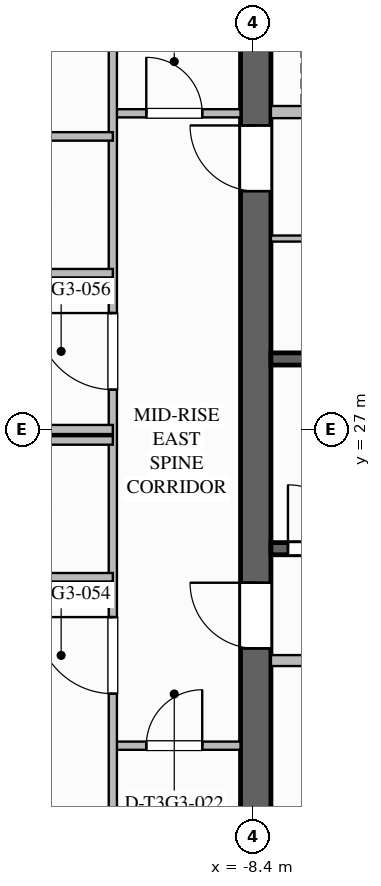
"""IFC4 building model, lengths in metres.
Left out: names, types, materials, properties, quantities, classifications, styles, units other than length and angle.
Written with IfcOpenShell. Run it as: python <this file> out.ifc"""

import sys

from ifc_helpers import new_model, si_unit, direction, frame, frame_2d, origin, place, context, subcontext, project, spatial, rectangle, extrude, element, fill, save


model = new_model("IFC4")
c1 = context("Model", 3, precision=1e-05, world=origin(), true_north=direction((0.0, 1.0)))
c2 = subcontext(c1, "Body", "Model", "MODEL_VIEW")
j1 = project(units=[si_unit("LENGTHUNIT", "METRE"), si_unit("PLANEANGLEUNIT", "RADIAN")], contexts=[c1])
p1 = place(None, origin())
s1 = spatial("IfcSite", under=j1, at=p1, CompositionType="ELEMENT")
p2 = place(p1, origin())
s2 = spatial("IfcBuilding", under=s1, at=p2, CompositionType="ELEMENT")
p3 = place(p2, frame((0.0, 0.0, 171.7)))
s3 = spatial("IfcBuildingStorey", under=s2, at=p3, CompositionType="ELEMENT", Elevation=171.7)
p4 = place(p3, frame((-8.35, 18.9, 0.0), z_axis=(0.0, 0.0, 1.0), x_axis=(0.0, 1.0, 0.0)))
e1 = element("IfcWall", 1, at=p4, inside=s3, PredefinedType="SHEAR", context=c2, shape_type="SweptSolid", body=[
    extrude(rectangle(XDim=16.2, YDim=0.5, at=frame_2d((8.1, 0.0))), origin(), (0.0, 0.0, 1.0), 3.55),
])
p5 = place(p4, frame((12.02, 0.0, 0.0)))
e2 = element("IfcOpeningElement", 2, at=p5, cuts=e1, PredefinedType="OPENING", context=c2, shape_type="SweptSolid", body=[
    extrude(rectangle(XDim=1.08, YDim=2.04, at=frame_2d((0.54, 1.02))), frame((0.0, 0.26, 0.0), z_axis=(0.0, -1.0, 0.0), x_axis=(1.0, 0.0, 0.0)), (0.0, 0.0, 1.0), 0.52),
])
p6 = place(p4, frame((4.5, 0.0, 0.0)))
e3 = element("IfcOpeningElement", 3, at=p6, cuts=e1, PredefinedType="OPENING", context=c2, shape_type="SweptSolid", body=[
    extrude(rectangle(XDim=1.08, YDim=2.04, at=frame_2d((0.54, 1.02))), frame((0.0, 0.26, 0.0), z_axis=(0.0, -1.0, 0.0), x_axis=(1.0, 0.0, 0.0)), (0.0, 0.0, 1.0), 0.52),
])
p7 = place(p3, frame((-8.1, 25.04, 0.0), z_axis=(0.0, 0.0, 1.0), x_axis=(1.0, 0.0, 0.0)))
e4 = element("IfcWall", 4, at=p7, inside=s3, PredefinedType="SOLIDWALL", context=c2, shape_type="SweptSolid", body=[
    extrude(rectangle(XDim=8.1, YDim=0.2, at=frame_2d((4.05, 0.0))), origin(), (0.0, 0.0, 1.0), 3.29),
])
p8 = place(p7, frame((0.28, 0.0, 0.0)))
e5 = element("IfcOpeningElement", 5, at=p8, cuts=e4, PredefinedType="OPENING", context=c2, shape_type="SweptSolid", body=[
    extrude(rectangle(XDim=1.05, YDim=2.1, at=frame_2d((0.525, 1.05))), frame((0.0, 0.11, 0.0), z_axis=(0.0, -1.0, 0.0), x_axis=(1.0, 0.0, 0.0)), (0.0, 0.0, 1.0), 0.22),
])
p9 = place(p3, frame((-8.1, 28.16, 0.0), z_axis=(0.0, 0.0, 1.0), x_axis=(1.0, 0.0, 0.0)))
e6 = element("IfcWall", 6, at=p9, inside=s3, PredefinedType="SOLIDWALL", context=c2, shape_type="SweptSolid", body=[
    extrude(rectangle(XDim=8.1, YDim=0.2, at=frame_2d((4.05, 0.0))), origin(), (0.0, 0.0, 1.0), 3.29),
])
p10 = place(p3, frame((-8.1, 32.22, 0.0), z_axis=(0.0, 0.0, 1.0), x_axis=(1.0, 0.0, 0.0)))
e7 = element("IfcWall", 7, at=p10, inside=s3, PredefinedType="SOLIDWALL", context=c2, shape_type="SweptSolid", body=[
    extrude(rectangle(XDim=7.1, YDim=0.2, at=frame_2d((3.55, 0.0))), origin(), (0.0, 0.0, 1.0), 3.29),
])
p11 = place(p10, frame((0.95, 0.0, 0.0)))
e8 = element("IfcOpeningElement", 8, at=p11, cuts=e7, PredefinedType="OPENING", context=c2, shape_type="SweptSolid", body=[
    extrude(rectangle(XDim=1.1, YDim=2.2, at=frame_2d((0.55, 1.1))), frame((0.0, 0.11, 0.0), z_axis=(0.0, -1.0, 0.0), x_axis=(1.0, 0.0, 0.0)), (0.0, 0.0, 1.0), 0.22),
])
p12 = place(p10, frame((3.27, 0.0, 0.0)))
e9 = element("IfcOpeningElement", 9, at=p12, cuts=e7, PredefinedType="OPENING", context=c2, shape_type="SweptSolid", body=[
    extrude(rectangle(XDim=1.1, YDim=2.2, at=frame_2d((0.55, 1.1))), frame((0.0, 0.11, 0.0), z_axis=(0.0, -1.0, 0.0), x_axis=(1.0, 0.0, 0.0)), (0.0, 0.0, 1.0), 0.22),
])
p13 = place(p10, frame((5.59, 0.0, 0.0)))
e10 = element("IfcOpeningElement", 10, at=p13, cuts=e7, PredefinedType="OPENING", context=c2, shape_type="SweptSolid", body=[
    extrude(rectangle(XDim=1.1, YDim=2.2, at=frame_2d((0.55, 1.1))), frame((0.0, 0.11, 0.0), z_axis=(0.0, -1.0, 0.0), x_axis=(1.0, 0.0, 0.0)), (0.0, 0.0, 1.0), 0.22),
])
p14 = place(p3, frame((-8.1, 30.14, 0.0), z_axis=(0.0, 0.0, 1.0), x_axis=(1.0, 0.0, 0.0)))
e11 = element("IfcWall", 11, at=p14, inside=s3, PredefinedType="PARTITIONING", context=c2, shape_type="SweptSolid", body=[
    extrude(rectangle(XDim=7.1, YDim=0.1, at=frame_2d((3.55, 0.0))), origin(), (0.0, 0.0, 1.0), 3.29),
])
p15 = place(p14, frame((2.8, 0.0, 0.0)))
e12 = element("IfcOpeningElement", 12, at=p15, cuts=e11, PredefinedType="OPENING", context=c2, shape_type="SweptSolid", body=[
    extrude(rectangle(XDim=0.92, YDim=2.1, at=frame_2d((0.46, 1.05))), frame((0.0, 0.06, 0.0), z_axis=(0.0, -1.0, 0.0), x_axis=(1.0, 0.0, 0.0)), (0.0, 0.0, 1.0), 0.12),
])
p16 = place(p3, frame((-8.1, 23.2, 0.0), z_axis=(0.0, 0.0, 1.0), x_axis=(1.0, 0.0, 0.0)))
e13 = element("IfcWall", 13, at=p16, inside=s3, PredefinedType="SOLIDWALL", context=c2, shape_type="SweptSolid", body=[
    extrude(rectangle(XDim=8.65, YDim=0.18, at=frame_2d((4.325, 0.0))), origin(), (0.0, 0.0, 1.0), 3.29),
])
p17 = place(p16, frame((1.6, 0.0, 0.0)))
e14 = element("IfcOpeningElement", 14, at=p17, cuts=e13, PredefinedType="OPENING", context=c2, shape_type="SweptSolid", body=[
    extrude(rectangle(XDim=1.0, YDim=2.1, at=frame_2d((0.5, 1.05))), frame((0.0, 0.1, 0.0), z_axis=(0.0, -1.0, 0.0), x_axis=(1.0, 0.0, 0.0)), (0.0, 0.0, 1.0), 0.2),
])
p18 = place(p16, frame((6.2, 0.0, 0.0)))
e15 = element("IfcOpeningElement", 15, at=p18, cuts=e13, PredefinedType="OPENING", context=c2, shape_type="SweptSolid", body=[
    extrude(rectangle(XDim=1.0, YDim=2.1, at=frame_2d((0.5, 1.05))), frame((0.0, 0.1, 0.0), z_axis=(0.0, -1.0, 0.0), x_axis=(1.0, 0.0, 0.0)), (0.0, 0.0, 1.0), 0.2),
])
p19 = place(p3, frame((-10.7, 21.8, 0.0), z_axis=(0.0, 0.0, 1.0), x_axis=(1.0, 0.0, 0.0)))
e16 = element("IfcWall", 16, at=p19, inside=s3, PredefinedType="PARTITIONING", context=c2, shape_type="SweptSolid", body=[
    extrude(rectangle(XDim=2.1, YDim=0.135, at=frame_2d((1.05, 0.0))), origin(), (0.0, 0.0, 1.0), 3.29),
])
p20 = place(p19, frame((0.55, 0.0, 0.0)))
e17 = element("IfcOpeningElement", 17, at=p20, cuts=e16, PredefinedType="OPENING", context=c2, shape_type="SweptSolid", body=[
    extrude(rectangle(XDim=0.92, YDim=2.1, at=frame_2d((0.46, 1.05))), frame((0.0, 0.077, 0.0), z_axis=(0.0, -1.0, 0.0), x_axis=(1.0, 0.0, 0.0)), (0.0, 0.0, 1.0), 0.155),
])
p21 = place(p3, frame((-10.7, 32.2, 0.0), z_axis=(0.0, 0.0, 1.0), x_axis=(1.0, 0.0, 0.0)))
e18 = element("IfcWall", 18, at=p21, inside=s3, PredefinedType="PARTITIONING", context=c2, shape_type="SweptSolid", body=[
    extrude(rectangle(XDim=2.1, YDim=0.135, at=frame_2d((1.05, 0.0))), origin(), (0.0, 0.0, 1.0), 3.29),
])
p22 = place(p21, frame((0.55, 0.0, 0.0)))
e19 = element("IfcOpeningElement", 19, at=p22, cuts=e18, PredefinedType="OPENING", context=c2, shape_type="SweptSolid", body=[
    extrude(rectangle(XDim=0.92, YDim=2.1, at=frame_2d((0.46, 1.05))), frame((0.0, 0.077, 0.0), z_axis=(0.0, -1.0, 0.0), x_axis=(1.0, 0.0, 0.0)), (0.0, 0.0, 1.0), 0.155),
])
p23 = place(p3, frame((-10.7, 18.4, 0.0), z_axis=(0.0, 0.0, 1.0), x_axis=(0.0, 1.0, 0.0)))
e20 = element("IfcWall", 20, at=p23, inside=s3, PredefinedType="PARTITIONING", context=c2, shape_type="SweptSolid", body=[
    extrude(rectangle(XDim=17.2, YDim=0.135, at=frame_2d((8.6, 0.0))), origin(), (0.0, 0.0, 1.0), 3.29),
])
p24 = place(p23, frame((4.255, 0.0, 0.0)))
e21 = element("IfcOpeningElement", 21, at=p24, cuts=e20, PredefinedType="OPENING", context=c2, shape_type="SweptSolid", body=[
    extrude(rectangle(XDim=1.26, YDim=2.2, at=frame_2d((0.63, 1.1))), frame((0.0, 0.077, 0.0), z_axis=(0.0, -1.0, 0.0), x_axis=(1.0, 0.0, 0.0)), (0.0, 0.0, 1.0), 0.155),
])
p25 = place(p23, frame((9.255, 0.0, 0.0)))
e22 = element("IfcOpeningElement", 22, at=p25, cuts=e20, PredefinedType="OPENING", context=c2, shape_type="SweptSolid", body=[
    extrude(rectangle(XDim=1.26, YDim=2.2, at=frame_2d((0.63, 1.1))), frame((0.0, 0.077, 0.0), z_axis=(0.0, -1.0, 0.0), x_axis=(1.0, 0.0, 0.0)), (0.0, 0.0, 1.0), 0.155),
])
p26 = place(p3, frame((-26.2, 27.0, 0.0), z_axis=(0.0, 0.0, 1.0), x_axis=(1.0, 0.0, 0.0)))
e23 = element("IfcWall", 23, at=p26, inside=s3, PredefinedType="PARTITIONING", context=c2, shape_type="SweptSolid", body=[
    extrude(rectangle(XDim=15.5, YDim=0.15, at=frame_2d((7.75, 0.0))), origin(), (0.0, 0.0, 1.0), 2.58),
])
p27 = place(p3, frame((-10.7, 24.57, 0.0), z_axis=(0.0, 0.0, 1.0), x_axis=(-1.0, 0.0, 0.0)))
e24 = element("IfcWall", 24, at=p27, inside=s3, PredefinedType="PLUMBINGWALL", context=c2, shape_type="SweptSolid", body=[
    extrude(rectangle(XDim=2.15, YDim=0.14, at=frame_2d((1.075, 0.0))), origin(), (0.0, 0.0, 1.0), 3.29),
])
p28 = place(p3, frame((-10.7, 26.82, 0.0), z_axis=(0.0, 0.0, 1.0), x_axis=(-1.0, 0.0, 0.0)))
e25 = element("IfcWall", 25, at=p28, inside=s3, PredefinedType="PLUMBINGWALL", context=c2, shape_type="SweptSolid", body=[
    extrude(rectangle(XDim=2.15, YDim=0.14, at=frame_2d((1.075, 0.0))), origin(), (0.0, 0.0, 1.0), 2.667),
])
for number, where, z_axis, x_axis in (
    (26, (-10.7, 29.57, 0.0), (0.0, 0.0, 1.0), (-1.0, 0.0, 0.0)),
    (27, (-10.7, 31.82, 0.0), (0.0, 0.0, 1.0), (-1.0, 0.0, 0.0)),
):
    element("IfcWall", number, at=place(p3, frame(where, z_axis=z_axis, x_axis=x_axis)), inside=s3, PredefinedType="PLUMBINGWALL", context=c2, shape_type="SweptSolid", body=[
        extrude(rectangle(XDim=2.15, YDim=0.14, at=frame_2d((1.075, 0.0))), origin(), (0.0, 0.0, 1.0), 3.29),
    ])
p29 = place(p8, origin())
e28 = element("IfcDoor", 28, at=p29, inside=s3, OperationType="SINGLE_SWING_LEFT", PredefinedType="DOOR", context=c2, shape_type="SweptSolid", body=[
    extrude(rectangle(XDim=1.05, YDim=2.1, at=frame_2d((0.525, 1.05))), frame((0.0, 0.025, 0.0), z_axis=(0.0, -1.0, 0.0), x_axis=(1.0, 0.0, 0.0)), (0.0, 0.0, 1.0), 0.05),
])
fill(e5, e28)
p30 = place(p5, origin())
e29 = element("IfcDoor", 29, at=p30, inside=s3, OperationType="SINGLE_SWING_RIGHT", PredefinedType="DOOR", context=c2, shape_type="SweptSolid", body=[
    extrude(rectangle(XDim=1.08, YDim=2.04, at=frame_2d((0.54, 1.02))), frame((0.0, 0.025, 0.0), z_axis=(0.0, -1.0, 0.0), x_axis=(1.0, 0.0, 0.0)), (0.0, 0.0, 1.0), 0.05),
])
fill(e2, e29)
p31 = place(p6, origin())
e30 = element("IfcDoor", 30, at=p31, inside=s3, OperationType="SINGLE_SWING_RIGHT", PredefinedType="DOOR", context=c2, shape_type="SweptSolid", body=[
    extrude(rectangle(XDim=1.08, YDim=2.04, at=frame_2d((0.54, 1.02))), frame((0.0, 0.025, 0.0), z_axis=(0.0, -1.0, 0.0), x_axis=(1.0, 0.0, 0.0)), (0.0, 0.0, 1.0), 0.05),
])
fill(e3, e30)
p32 = place(p20, origin())
e31 = element("IfcDoor", 31, at=p32, inside=s3, OperationType="SINGLE_SWING_RIGHT", PredefinedType="DOOR", context=c2, shape_type="SweptSolid", body=[
    extrude(rectangle(XDim=0.92, YDim=2.1, at=frame_2d((0.46, 1.05))), frame((0.0, 0.025, 0.0), z_axis=(0.0, -1.0, 0.0), x_axis=(1.0, 0.0, 0.0)), (0.0, 0.0, 1.0), 0.05),
])
fill(e17, e31)
p33 = place(p22, origin())
e32 = element("IfcDoor", 32, at=p33, inside=s3, OperationType="SINGLE_SWING_LEFT", PredefinedType="DOOR", context=c2, shape_type="SweptSolid", body=[
    extrude(rectangle(XDim=0.92, YDim=2.1, at=frame_2d((0.46, 1.05))), frame((0.0, 0.025, 0.0), z_axis=(0.0, -1.0, 0.0), x_axis=(1.0, 0.0, 0.0)), (0.0, 0.0, 1.0), 0.05),
])
fill(e19, e32)
p34 = place(p24, origin())
e33 = element("IfcDoor", 33, at=p34, inside=s3, OperationType="SINGLE_SWING_RIGHT", PredefinedType="DOOR", context=c2, shape_type="SweptSolid", body=[
    extrude(rectangle(XDim=1.26, YDim=2.2, at=frame_2d((0.63, 1.1))), frame((0.0, 0.025, 0.0), z_axis=(0.0, -1.0, 0.0), x_axis=(1.0, 0.0, 0.0)), (0.0, 0.0, 1.0), 0.05),
])
fill(e21, e33)
p35 = place(p25, origin())
e34 = element("IfcDoor", 34, at=p35, inside=s3, OperationType="SINGLE_SWING_RIGHT", PredefinedType="DOOR", context=c2, shape_type="SweptSolid", body=[
    extrude(rectangle(XDim=1.26, YDim=2.2, at=frame_2d((0.63, 1.1))), frame((0.0, 0.025, 0.0), z_axis=(0.0, -1.0, 0.0), x_axis=(1.0, 0.0, 0.0)), (0.0, 0.0, 1.0), 0.05),
])
fill(e22, e34)
save(model, sys.argv[1])
